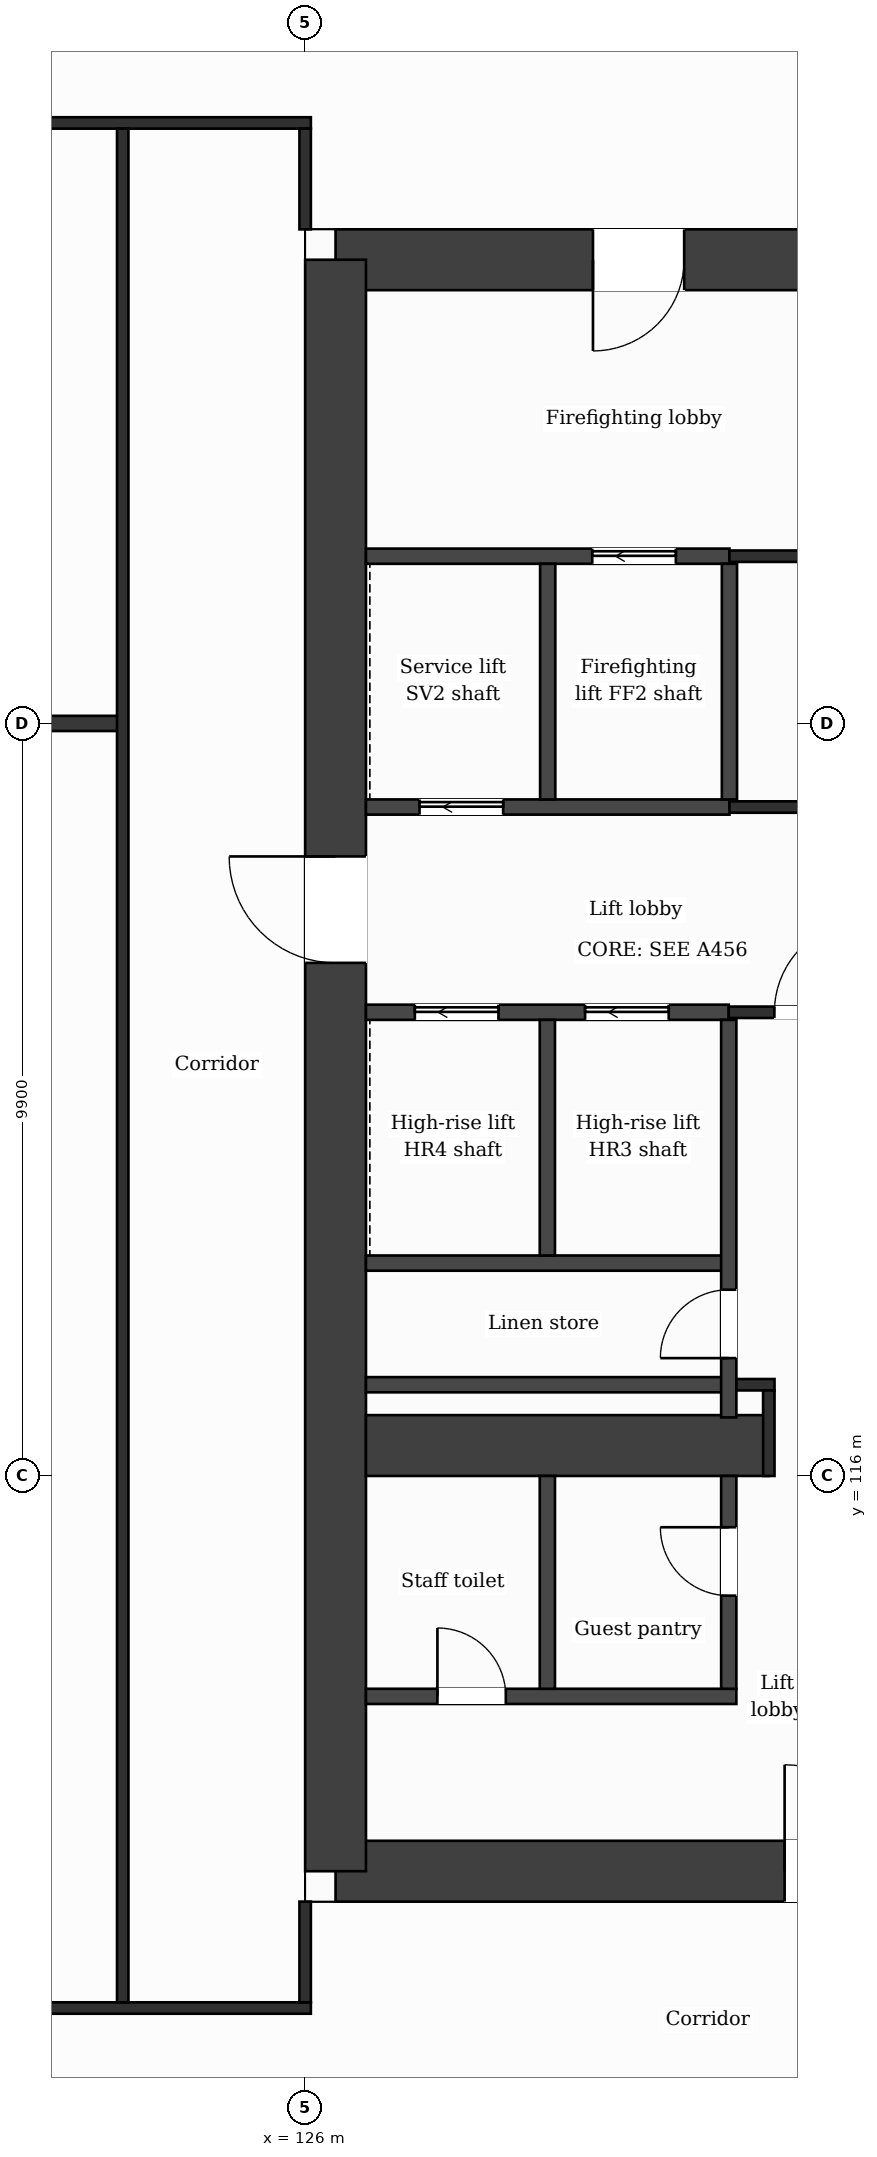
"""IFC4 building model, lengths in metres.
Left out: names, types, materials, properties, quantities, classifications, styles, units other than length and angle.
Written with IfcOpenShell. Run it as: python <this file> out.ifc"""

import sys

from ifc_helpers import new_model, si_unit, direction, frame, frame_2d, origin, place, context, subcontext, project, spatial, rectangle, extrude, element, fill, save


model = new_model("IFC4")
c1 = context("Model", 3, precision=1e-05, world=origin(), true_north=direction((0.0, 1.0)))
c2 = subcontext(c1, "Body", "Model", "MODEL_VIEW")
j1 = project(units=[si_unit("LENGTHUNIT", "METRE"), si_unit("PLANEANGLEUNIT", "RADIAN")], contexts=[c1])
p1 = place(None, origin())
s1 = spatial("IfcSite", under=j1, at=p1, CompositionType="ELEMENT")
p2 = place(p1, origin())
s2 = spatial("IfcBuilding", under=s1, at=p2, CompositionType="ELEMENT")
p3 = place(p2, frame((0.0, 0.0, 228.1)))
s3 = spatial("IfcBuildingStorey", under=s2, at=p3, CompositionType="ELEMENT", Elevation=228.1)
p4 = place(p3, frame((126.4, 132.0, 0.0), z_axis=(0.0, 0.0, 1.0), x_axis=(1.0, 0.0, 0.0)))
e1 = element("IfcWall", 1, at=p4, inside=s3, PredefinedType="SHEAR", context=c2, shape_type="SweptSolid", body=[
    extrude(rectangle(XDim=11.42, YDim=0.8, at=frame_2d((5.71, 0.0))), origin(), (0.0, 0.0, 1.0), 3.7),
])
p5 = place(p4, frame((3.386, 0.0, 0.0)))
e2 = element("IfcOpeningElement", 2, at=p5, cuts=e1, PredefinedType="OPENING", context=c2, shape_type="SweptSolid", body=[
    extrude(rectangle(XDim=1.2, YDim=2.1, at=frame_2d((0.6, 1.05))), frame((0.0, 0.41, 0.0), z_axis=(0.0, -1.0, 0.0), x_axis=(1.0, 0.0, 0.0)), (0.0, 0.0, 1.0), 0.82),
])
p6 = place(p3, frame((140.673, 110.8, 0.0), z_axis=(0.0, 0.0, 1.0), x_axis=(-1.0, 0.0, 0.0)))
e3 = element("IfcWall", 3, at=p6, inside=s3, PredefinedType="SHEAR", context=c2, shape_type="SweptSolid", body=[
    extrude(rectangle(XDim=14.273, YDim=0.8, at=frame_2d((7.137, 0.0))), origin(), (0.0, 0.0, 1.0), 3.7),
])
p7 = place(p6, frame((6.965, 0.0, 0.0)))
e4 = element("IfcOpeningElement", 4, at=p7, cuts=e3, PredefinedType="OPENING", context=c2, shape_type="SweptSolid", body=[
    extrude(rectangle(XDim=1.4, YDim=2.1, at=frame_2d((0.7, 1.05))), frame((0.0, 0.41, 0.0), z_axis=(0.0, -1.0, 0.0), x_axis=(1.0, 0.0, 0.0)), (0.0, 0.0, 1.0), 0.82),
])
p8 = place(p3, frame((126.4, 110.8, 0.0), z_axis=(0.0, 0.0, 1.0), x_axis=(0.0, 1.0, 0.0)))
e5 = element("IfcWall", 5, at=p8, inside=s3, PredefinedType="SHEAR", context=c2, shape_type="SweptSolid", body=[
    extrude(rectangle(XDim=21.2, YDim=0.8, at=frame_2d((10.6, 0.0))), origin(), (0.0, 0.0, 1.0), 3.7),
])
p9 = place(p8, frame((11.95, 0.0, 0.0)))
e6 = element("IfcOpeningElement", 6, at=p9, cuts=e5, PredefinedType="OPENING", context=c2, shape_type="SweptSolid", body=[
    extrude(rectangle(XDim=1.4, YDim=2.1, at=frame_2d((0.7, 1.05))), frame((0.0, 0.41, 0.0), z_axis=(0.0, -1.0, 0.0), x_axis=(1.0, 0.0, 0.0)), (0.0, 0.0, 1.0), 0.82),
])
p10 = place(p3, frame((126.8, 116.4, 0.0), z_axis=(0.0, 0.0, 1.0), x_axis=(1.0, 0.0, 0.0)))
e7 = element("IfcWall", 7, at=p10, inside=s3, PredefinedType="SHEAR", context=c2, shape_type="SweptSolid", body=[
    extrude(rectangle(XDim=5.3, YDim=0.8, at=frame_2d((2.65, 0.0))), origin(), (0.0, 0.0, 1.0), 3.7),
])
p11 = place(p3, frame((100.725, 109.0, 0.0), z_axis=(0.0, 0.0, 1.0), x_axis=(1.0, 0.0, 0.0)))
e8 = element("IfcWall", 8, at=p11, inside=s3, PredefinedType="PARTITIONING", context=c2, shape_type="SweptSolid", body=[
    extrude(rectangle(XDim=25.35, YDim=0.15, at=frame_2d((12.675, 0.0))), origin(), (0.0, 0.0, 1.0), 3.38),
])
p12 = place(p11, frame((6.8, 0.0, 0.0)))
e9 = element("IfcOpeningElement", 9, at=p12, cuts=e8, PredefinedType="OPENING", context=c2, shape_type="SweptSolid", body=[
    extrude(rectangle(XDim=1.0, YDim=2.1, at=frame_2d((0.5, 1.05))), frame((0.0, 0.085, 0.0), z_axis=(0.0, -1.0, 0.0), x_axis=(1.0, 0.0, 0.0)), (0.0, 0.0, 1.0), 0.17),
])
p13 = place(p11, frame((3.475, 0.0, 0.0)))
e10 = element("IfcOpeningElement", 10, at=p13, cuts=e8, PredefinedType="OPENING", context=c2, shape_type="SweptSolid", body=[
    extrude(rectangle(XDim=1.0, YDim=2.1, at=frame_2d((0.5, 1.05))), frame((0.0, 0.085, 0.0), z_axis=(0.0, -1.0, 0.0), x_axis=(1.0, 0.0, 0.0)), (0.0, 0.0, 1.0), 0.17),
])
p14 = place(p11, frame((10.5, 0.0, 0.0)))
e11 = element("IfcOpeningElement", 11, at=p14, cuts=e8, PredefinedType="OPENING", context=c2, shape_type="SweptSolid", body=[
    extrude(rectangle(XDim=1.0, YDim=2.1, at=frame_2d((0.5, 1.05))), frame((0.0, 0.085, 0.0), z_axis=(0.0, -1.0, 0.0), x_axis=(1.0, 0.0, 0.0)), (0.0, 0.0, 1.0), 0.17),
])
p15 = place(p11, frame((19.375, 0.0, 0.0)))
e12 = element("IfcOpeningElement", 12, at=p15, cuts=e8, PredefinedType="OPENING", context=c2, shape_type="SweptSolid", body=[
    extrude(rectangle(XDim=1.0, YDim=2.1, at=frame_2d((0.5, 1.05))), frame((0.0, 0.085, 0.0), z_axis=(0.0, -1.0, 0.0), x_axis=(1.0, 0.0, 0.0)), (0.0, 0.0, 1.0), 0.17),
])
p16 = place(p3, frame((126.8, 113.1, 0.0), z_axis=(0.0, 0.0, 1.0), x_axis=(1.0, 0.0, 0.0)))
e13 = element("IfcWall", 13, at=p16, inside=s3, PredefinedType="PARTITIONING", context=c2, shape_type="SweptSolid", body=[
    extrude(rectangle(XDim=4.873, YDim=0.2, at=frame_2d((2.437, 0.0))), origin(), (0.0, 0.0, 1.0), 3.38),
])
p17 = place(p16, frame((0.94, 0.0, 0.0)))
e14 = element("IfcOpeningElement", 14, at=p17, cuts=e13, PredefinedType="OPENING", context=c2, shape_type="SweptSolid", body=[
    extrude(rectangle(XDim=0.9, YDim=2.1, at=frame_2d((0.45, 1.05))), frame((0.0, 0.11, 0.0), z_axis=(0.0, -1.0, 0.0), x_axis=(1.0, 0.0, 0.0)), (0.0, 0.0, 1.0), 0.22),
])
p18 = place(p3, frame((126.8, 117.2, 0.0), z_axis=(0.0, 0.0, 1.0), x_axis=(1.0, 0.0, 0.0)))
e15 = element("IfcWall", 15, at=p18, inside=s3, PredefinedType="PARTITIONING", context=c2, shape_type="SweptSolid", body=[
    extrude(rectangle(XDim=4.773, YDim=0.2, at=frame_2d((2.386, 0.0))), origin(), (0.0, 0.0, 1.0), 3.38),
])
p19 = place(p3, frame((131.573, 117.2, 0.0), z_axis=(0.0, 0.0, 1.0), x_axis=(1.0, 0.0, 0.0)))
e16 = element("IfcWall", 16, at=p19, inside=s3, PredefinedType="PARTITIONING", context=c2, shape_type="SweptSolid", body=[
    extrude(rectangle(XDim=0.602, YDim=0.15, at=frame_2d((0.301, 0.0))), origin(), (0.0, 0.0, 1.0), 3.38),
])
p20 = place(p3, frame((126.8, 118.8, 0.0), z_axis=(0.0, 0.0, 1.0), x_axis=(1.0, 0.0, 0.0)))
e17 = element("IfcWall", 17, at=p20, inside=s3, PredefinedType="PARTITIONING", context=c2, shape_type="SweptSolid", body=[
    extrude(rectangle(XDim=4.773, YDim=0.2, at=frame_2d((2.386, 0.0))), origin(), (0.0, 0.0, 1.0), 3.38),
])
p21 = place(p3, frame((126.8, 122.1, 0.0), z_axis=(0.0, 0.0, 1.0), x_axis=(1.0, 0.0, 0.0)))
e18 = element("IfcWall", 18, at=p21, inside=s3, PredefinedType="PARTITIONING", context=c2, shape_type="SweptSolid", body=[
    extrude(rectangle(XDim=4.773, YDim=0.2, at=frame_2d((2.386, 0.0))), origin(), (0.0, 0.0, 1.0), 3.38),
])
p22 = place(p21, frame((2.883, 0.0, 0.0)))
e19 = element("IfcOpeningElement", 19, at=p22, cuts=e18, PredefinedType="OPENING", context=c2, shape_type="SweptSolid", body=[
    extrude(rectangle(XDim=1.1, YDim=2.1, at=frame_2d((0.55, 1.05))), frame((0.0, 0.11, 0.0), z_axis=(0.0, -1.0, 0.0), x_axis=(1.0, 0.0, 0.0)), (0.0, 0.0, 1.0), 0.22),
])
p23 = place(p21, frame((0.643, 0.0, 0.0)))
e20 = element("IfcOpeningElement", 20, at=p23, cuts=e18, PredefinedType="OPENING", context=c2, shape_type="SweptSolid", body=[
    extrude(rectangle(XDim=1.1, YDim=2.1, at=frame_2d((0.55, 1.05))), frame((0.0, 0.11, 0.0), z_axis=(0.0, -1.0, 0.0), x_axis=(1.0, 0.0, 0.0)), (0.0, 0.0, 1.0), 0.22),
])
p24 = place(p3, frame((131.573, 122.1, 0.0), z_axis=(0.0, 0.0, 1.0), x_axis=(1.0, 0.0, 0.0)))
e21 = element("IfcWall", 21, at=p24, inside=s3, PredefinedType="PARTITIONING", context=c2, shape_type="SweptSolid", body=[
    extrude(rectangle(XDim=2.4, YDim=0.15, at=frame_2d((1.2, 0.0))), origin(), (0.0, 0.0, 1.0), 3.38),
])
p25 = place(p24, frame((0.6, 0.0, 0.0)))
e22 = element("IfcOpeningElement", 22, at=p25, cuts=e21, PredefinedType="OPENING", context=c2, shape_type="SweptSolid", body=[
    extrude(rectangle(XDim=1.2, YDim=2.1, at=frame_2d((0.6, 1.05))), frame((0.0, 0.085, 0.0), z_axis=(0.0, -1.0, 0.0), x_axis=(1.0, 0.0, 0.0)), (0.0, 0.0, 1.0), 0.17),
])
p26 = place(p3, frame((126.8, 124.8, 0.0), z_axis=(0.0, 0.0, 1.0), x_axis=(1.0, 0.0, 0.0)))
e23 = element("IfcWall", 23, at=p26, inside=s3, PredefinedType="PARTITIONING", context=c2, shape_type="SweptSolid", body=[
    extrude(rectangle(XDim=4.782, YDim=0.2, at=frame_2d((2.391, 0.0))), origin(), (0.0, 0.0, 1.0), 3.38),
])
p27 = place(p26, frame((0.705, 0.0, 0.0)))
e24 = element("IfcOpeningElement", 24, at=p27, cuts=e23, PredefinedType="OPENING", context=c2, shape_type="SweptSolid", body=[
    extrude(rectangle(XDim=1.1, YDim=2.1, at=frame_2d((0.55, 1.05))), frame((0.0, 0.11, 0.0), z_axis=(0.0, -1.0, 0.0), x_axis=(1.0, 0.0, 0.0)), (0.0, 0.0, 1.0), 0.22),
])
p28 = place(p3, frame((131.582, 124.8, 0.0), z_axis=(0.0, 0.0, 1.0), x_axis=(1.0, 0.0, 0.0)))
e25 = element("IfcWall", 25, at=p28, inside=s3, PredefinedType="PARTITIONING", context=c2, shape_type="SweptSolid", body=[
    extrude(rectangle(XDim=2.516, YDim=0.15, at=frame_2d((1.258, 0.0))), origin(), (0.0, 0.0, 1.0), 3.38),
])
p29 = place(p3, frame((117.6, 125.9, 0.0), z_axis=(0.0, 0.0, 1.0), x_axis=(1.0, 0.0, 0.0)))
e26 = element("IfcWall", 26, at=p29, inside=s3, PredefinedType="PARTITIONING", context=c2, shape_type="SweptSolid", body=[
    extrude(rectangle(XDim=6.0, YDim=0.2, at=frame_2d((3.0, 0.0))), origin(), (0.0, 0.0, 1.0), 3.38),
])
p30 = place(p3, frame((126.8, 128.1, 0.0), z_axis=(0.0, 0.0, 1.0), x_axis=(1.0, 0.0, 0.0)))
e27 = element("IfcWall", 27, at=p30, inside=s3, PredefinedType="PARTITIONING", context=c2, shape_type="SweptSolid", body=[
    extrude(rectangle(XDim=4.782, YDim=0.2, at=frame_2d((2.391, 0.0))), origin(), (0.0, 0.0, 1.0), 3.38),
])
p31 = place(p30, frame((2.977, 0.0, 0.0)))
e28 = element("IfcOpeningElement", 28, at=p31, cuts=e27, PredefinedType="OPENING", context=c2, shape_type="SweptSolid", body=[
    extrude(rectangle(XDim=1.1, YDim=2.1, at=frame_2d((0.55, 1.05))), frame((0.0, 0.11, 0.0), z_axis=(0.0, -1.0, 0.0), x_axis=(1.0, 0.0, 0.0)), (0.0, 0.0, 1.0), 0.22),
])
p32 = place(p3, frame((131.582, 128.1, 0.0), z_axis=(0.0, 0.0, 1.0), x_axis=(1.0, 0.0, 0.0)))
e29 = element("IfcWall", 29, at=p32, inside=s3, PredefinedType="PARTITIONING", context=c2, shape_type="SweptSolid", body=[
    extrude(rectangle(XDim=2.391, YDim=0.15, at=frame_2d((1.195, 0.0))), origin(), (0.0, 0.0, 1.0), 3.38),
])
p33 = place(p3, frame((100.725, 133.8, 0.0), z_axis=(0.0, 0.0, 1.0), x_axis=(1.0, 0.0, 0.0)))
e30 = element("IfcWall", 30, at=p33, inside=s3, PredefinedType="PARTITIONING", context=c2, shape_type="SweptSolid", body=[
    extrude(rectangle(XDim=25.35, YDim=0.15, at=frame_2d((12.675, 0.0))), origin(), (0.0, 0.0, 1.0), 3.38),
])
p34 = place(p33, frame((6.05, 0.0, 0.0)))
e31 = element("IfcOpeningElement", 31, at=p34, cuts=e30, PredefinedType="OPENING", context=c2, shape_type="SweptSolid", body=[
    extrude(rectangle(XDim=1.0, YDim=2.1, at=frame_2d((0.5, 1.05))), frame((0.0, 0.085, 0.0), z_axis=(0.0, -1.0, 0.0), x_axis=(1.0, 0.0, 0.0)), (0.0, 0.0, 1.0), 0.17),
])
p35 = place(p33, frame((19.375, 0.0, 0.0)))
e32 = element("IfcOpeningElement", 32, at=p35, cuts=e30, PredefinedType="OPENING", context=c2, shape_type="SweptSolid", body=[
    extrude(rectangle(XDim=1.0, YDim=2.1, at=frame_2d((0.5, 1.05))), frame((0.0, 0.085, 0.0), z_axis=(0.0, -1.0, 0.0), x_axis=(1.0, 0.0, 0.0)), (0.0, 0.0, 1.0), 0.17),
])
p36 = place(p3, frame((123.6, 109.075, 0.0), z_axis=(0.0, 0.0, 1.0), x_axis=(0.0, 1.0, 0.0)))
e33 = element("IfcWall", 33, at=p36, inside=s3, PredefinedType="PARTITIONING", context=c2, shape_type="SweptSolid", body=[
    extrude(rectangle(XDim=24.65, YDim=0.15, at=frame_2d((12.325, 0.0))), origin(), (0.0, 0.0, 1.0), 3.38),
])
p37 = place(p3, frame((126.0, 109.075, 0.0), z_axis=(0.0, 0.0, 1.0), x_axis=(0.0, 1.0, 0.0)))
e34 = element("IfcWall", 34, at=p37, inside=s3, PredefinedType="PARTITIONING", context=c2, shape_type="SweptSolid", body=[
    extrude(rectangle(XDim=1.325, YDim=0.15, at=frame_2d((0.663, 0.0))), origin(), (0.0, 0.0, 1.0), 3.38),
])
p38 = place(p3, frame((126.0, 132.4, 0.0), z_axis=(0.0, 0.0, 1.0), x_axis=(0.0, 1.0, 0.0)))
e35 = element("IfcWall", 35, at=p38, inside=s3, PredefinedType="PARTITIONING", context=c2, shape_type="SweptSolid", body=[
    extrude(rectangle(XDim=1.325, YDim=0.15, at=frame_2d((0.663, 0.0))), origin(), (0.0, 0.0, 1.0), 3.38),
])
p39 = place(p3, frame((129.187, 113.2, 0.0), z_axis=(0.0, 0.0, 1.0), x_axis=(0.0, 1.0, 0.0)))
e36 = element("IfcWall", 36, at=p39, inside=s3, PredefinedType="PARTITIONING", context=c2, shape_type="SweptSolid", body=[
    extrude(rectangle(XDim=2.8, YDim=0.2, at=frame_2d((1.4, 0.0))), origin(), (0.0, 0.0, 1.0), 3.38),
])
for number, where, z_axis, x_axis in (
    (37, (129.187, 118.9, 0.0), (0.0, 0.0, 1.0), (0.0, 1.0, 0.0)),
    (38, (129.191, 124.9, 0.0), (0.0, 0.0, 1.0), (0.0, 1.0, 0.0)),
):
    element("IfcWall", number, at=place(p3, frame(where, z_axis=z_axis, x_axis=x_axis)), inside=s3, PredefinedType="PARTITIONING", context=c2, shape_type="SweptSolid", body=[
        extrude(rectangle(XDim=3.1, YDim=0.2, at=frame_2d((1.55, 0.0))), origin(), (0.0, 0.0, 1.0), 3.38),
    ])
p40 = place(p3, frame((131.573, 113.2, 0.0), z_axis=(0.0, 0.0, 1.0), x_axis=(0.0, 1.0, 0.0)))
e39 = element("IfcWall", 39, at=p40, inside=s3, PredefinedType="PARTITIONING", context=c2, shape_type="SweptSolid", body=[
    extrude(rectangle(XDim=2.8, YDim=0.2, at=frame_2d((1.4, 0.0))), origin(), (0.0, 0.0, 1.0), 3.38),
])
p41 = place(p40, frame((1.225, 0.0, 0.0)))
e40 = element("IfcOpeningElement", 40, at=p41, cuts=e39, PredefinedType="OPENING", context=c2, shape_type="SweptSolid", body=[
    extrude(rectangle(XDim=0.9, YDim=2.1, at=frame_2d((0.45, 1.05))), frame((0.0, 0.11, 0.0), z_axis=(0.0, -1.0, 0.0), x_axis=(1.0, 0.0, 0.0)), (0.0, 0.0, 1.0), 0.22),
])
p42 = place(p3, frame((131.573, 116.77, 0.0), z_axis=(0.0, 0.0, 1.0), x_axis=(0.0, 1.0, 0.0)))
e41 = element("IfcWall", 41, at=p42, inside=s3, PredefinedType="PARTITIONING", context=c2, shape_type="SweptSolid", body=[
    extrude(rectangle(XDim=5.23, YDim=0.2, at=frame_2d((2.615, 0.0))), origin(), (0.0, 0.0, 1.0), 3.38),
])
p43 = place(p42, frame((0.78, 0.0, 0.0)))
e42 = element("IfcOpeningElement", 42, at=p43, cuts=e41, PredefinedType="OPENING", context=c2, shape_type="SweptSolid", body=[
    extrude(rectangle(XDim=0.9, YDim=2.1, at=frame_2d((0.45, 1.05))), frame((0.0, 0.11, 0.0), z_axis=(0.0, -1.0, 0.0), x_axis=(1.0, 0.0, 0.0)), (0.0, 0.0, 1.0), 0.22),
])
p44 = place(p3, frame((131.582, 124.9, 0.0), z_axis=(0.0, 0.0, 1.0), x_axis=(0.0, 1.0, 0.0)))
e43 = element("IfcWall", 43, at=p44, inside=s3, PredefinedType="PARTITIONING", context=c2, shape_type="SweptSolid", body=[
    extrude(rectangle(XDim=3.1, YDim=0.2, at=frame_2d((1.55, 0.0))), origin(), (0.0, 0.0, 1.0), 3.38),
])
p45 = place(p3, frame((132.1, 116.0, 0.0), z_axis=(0.0, 0.0, 1.0), x_axis=(0.0, 1.0, 0.0)))
e44 = element("IfcWall", 44, at=p45, inside=s3, PredefinedType="PARTITIONING", context=c2, shape_type="SweptSolid", body=[
    extrude(rectangle(XDim=1.125, YDim=0.15, at=frame_2d((0.562, 0.0))), origin(), (0.0, 0.0, 1.0), 3.38),
])
p46 = place(p25, origin())
e45 = element("IfcDoor", 45, at=p46, inside=s3, OperationType="SINGLE_SWING_RIGHT", PredefinedType="DOOR", context=c2, shape_type="SweptSolid", body=[
    extrude(rectangle(XDim=1.2, YDim=2.1, at=frame_2d((0.6, 1.05))), frame((0.0, 0.025, 0.0), z_axis=(0.0, -1.0, 0.0), x_axis=(1.0, 0.0, 0.0)), (0.0, 0.0, 1.0), 0.05),
])
fill(e22, e45)
p47 = place(p22, origin())
e46 = element("IfcDoor", 46, at=p47, inside=s3, OperationType="SLIDING_TO_LEFT", PredefinedType="DOOR", context=c2, shape_type="SweptSolid", body=[
    extrude(rectangle(XDim=1.1, YDim=2.1, at=frame_2d((0.55, 1.05))), frame((0.0, 0.025, 0.0), z_axis=(0.0, -1.0, 0.0), x_axis=(1.0, 0.0, 0.0)), (0.0, 0.0, 1.0), 0.05),
])
fill(e19, e46)
p48 = place(p23, origin())
e47 = element("IfcDoor", 47, at=p48, inside=s3, OperationType="SLIDING_TO_LEFT", PredefinedType="DOOR", context=c2, shape_type="SweptSolid", body=[
    extrude(rectangle(XDim=1.1, YDim=2.1, at=frame_2d((0.55, 1.05))), frame((0.0, 0.025, 0.0), z_axis=(0.0, -1.0, 0.0), x_axis=(1.0, 0.0, 0.0)), (0.0, 0.0, 1.0), 0.05),
])
fill(e20, e47)
p49 = place(p31, origin())
e48 = element("IfcDoor", 48, at=p49, inside=s3, OperationType="SLIDING_TO_LEFT", PredefinedType="DOOR", context=c2, shape_type="SweptSolid", body=[
    extrude(rectangle(XDim=1.1, YDim=2.1, at=frame_2d((0.55, 1.05))), frame((0.0, 0.025, 0.0), z_axis=(0.0, -1.0, 0.0), x_axis=(1.0, 0.0, 0.0)), (0.0, 0.0, 1.0), 0.05),
])
fill(e28, e48)
p50 = place(p27, origin())
e49 = element("IfcDoor", 49, at=p50, inside=s3, OperationType="SLIDING_TO_LEFT", PredefinedType="DOOR", context=c2, shape_type="SweptSolid", body=[
    extrude(rectangle(XDim=1.1, YDim=2.1, at=frame_2d((0.55, 1.05))), frame((0.0, 0.025, 0.0), z_axis=(0.0, -1.0, 0.0), x_axis=(1.0, 0.0, 0.0)), (0.0, 0.0, 1.0), 0.05),
])
fill(e24, e49)
p51 = place(p43, origin())
e50 = element("IfcDoor", 50, at=p51, inside=s3, OperationType="SINGLE_SWING_LEFT", PredefinedType="DOOR", context=c2, shape_type="SweptSolid", body=[
    extrude(rectangle(XDim=0.9, YDim=2.1, at=frame_2d((0.45, 1.05))), frame((0.0, 0.025, 0.0), z_axis=(0.0, -1.0, 0.0), x_axis=(1.0, 0.0, 0.0)), (0.0, 0.0, 1.0), 0.05),
])
fill(e42, e50)
p52 = place(p41, origin())
e51 = element("IfcDoor", 51, at=p52, inside=s3, OperationType="SINGLE_SWING_RIGHT", PredefinedType="DOOR", context=c2, shape_type="SweptSolid", body=[
    extrude(rectangle(XDim=0.9, YDim=2.1, at=frame_2d((0.45, 1.05))), frame((0.0, 0.025, 0.0), z_axis=(0.0, -1.0, 0.0), x_axis=(1.0, 0.0, 0.0)), (0.0, 0.0, 1.0), 0.05),
])
fill(e40, e51)
p53 = place(p17, origin())
e52 = element("IfcDoor", 52, at=p53, inside=s3, OperationType="SINGLE_SWING_LEFT", PredefinedType="DOOR", context=c2, shape_type="SweptSolid", body=[
    extrude(rectangle(XDim=0.9, YDim=2.1, at=frame_2d((0.45, 1.05))), frame((0.0, 0.025, 0.0), z_axis=(0.0, -1.0, 0.0), x_axis=(1.0, 0.0, 0.0)), (0.0, 0.0, 1.0), 0.05),
])
fill(e14, e52)
p54 = place(p7, origin())
e53 = element("IfcDoor", 53, at=p54, inside=s3, OperationType="SINGLE_SWING_RIGHT", PredefinedType="DOOR", context=c2, shape_type="SweptSolid", body=[
    extrude(rectangle(XDim=1.4, YDim=2.1, at=frame_2d((0.7, 1.05))), frame((0.0, 0.025, 0.0), z_axis=(0.0, -1.0, 0.0), x_axis=(1.0, 0.0, 0.0)), (0.0, 0.0, 1.0), 0.05),
])
fill(e4, e53)
p55 = place(p5, origin())
e54 = element("IfcDoor", 54, at=p55, inside=s3, OperationType="SINGLE_SWING_LEFT", PredefinedType="DOOR", context=c2, shape_type="SweptSolid", body=[
    extrude(rectangle(XDim=1.2, YDim=2.1, at=frame_2d((0.6, 1.05))), frame((0.0, 0.025, 0.0), z_axis=(0.0, -1.0, 0.0), x_axis=(1.0, 0.0, 0.0)), (0.0, 0.0, 1.0), 0.05),
])
fill(e2, e54)
p56 = place(p9, origin())
e55 = element("IfcDoor", 55, at=p56, inside=s3, OperationType="SINGLE_SWING_RIGHT", PredefinedType="DOOR", context=c2, shape_type="SweptSolid", body=[
    extrude(rectangle(XDim=1.4, YDim=2.1, at=frame_2d((0.7, 1.05))), frame((0.0, 0.025, 0.0), z_axis=(0.0, -1.0, 0.0), x_axis=(1.0, 0.0, 0.0)), (0.0, 0.0, 1.0), 0.05),
])
fill(e6, e55)
save(model, sys.argv[1])
